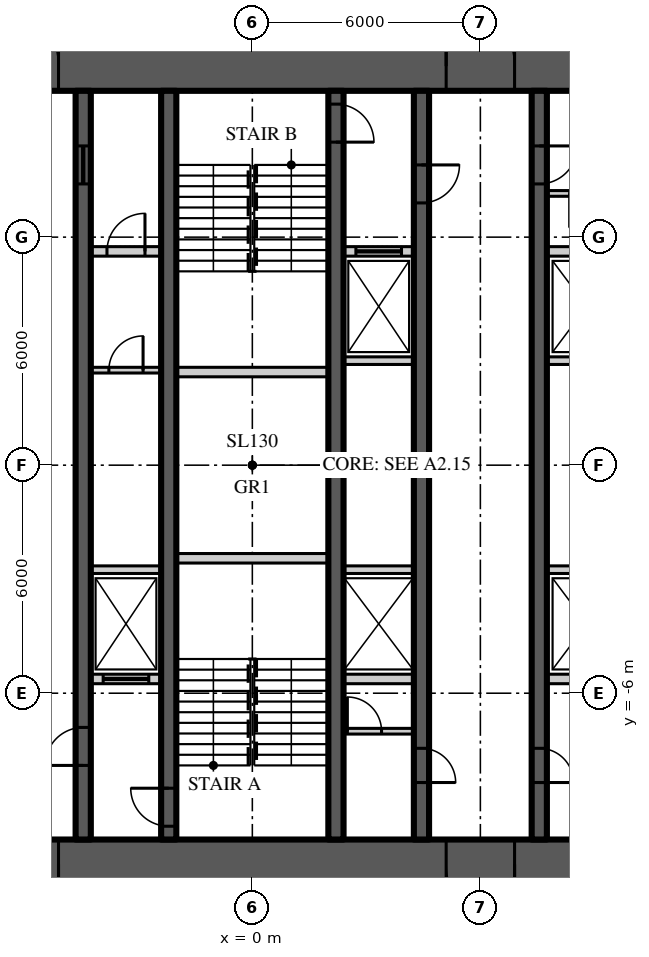
"""IFC4 building model, lengths in metres.
Left out: names, types, materials, properties, quantities, classifications, styles, units other than length and angle.
Written with IfcOpenShell. Run it as: python <this file> out.ifc"""

import sys

from ifc_helpers import new_model, si_unit, direction, frame, frame_2d, origin, place, context, subcontext, project, spatial, rectangle, extrude, element, fill, save


model = new_model("IFC4")
c1 = context("Model", 3, precision=1e-05, world=origin(), true_north=direction((0.0, 1.0)))
c2 = subcontext(c1, "Body", "Model", "MODEL_VIEW")
j1 = project(units=[si_unit("LENGTHUNIT", "METRE"), si_unit("PLANEANGLEUNIT", "RADIAN")], contexts=[c1])
p1 = place(None, origin())
s1 = spatial("IfcSite", under=j1, at=p1, CompositionType="ELEMENT")
p2 = place(p1, origin())
s2 = spatial("IfcBuilding", under=s1, at=p2, CompositionType="ELEMENT")
p3 = place(p2, frame((0.0, 0.0, 102.0)))
s3 = spatial("IfcBuildingStorey", under=s2, at=p3, CompositionType="ELEMENT", Elevation=102.0)
p4 = place(p3, frame((-11.15, 10.5, 0.0), z_axis=(0.0, 0.0, 1.0), x_axis=(1.0, 0.0, 0.0)))
e1 = element("IfcWall", 1, at=p4, inside=s3, PredefinedType="SHEAR", context=c2, shape_type="SweptSolid", body=[
    extrude(rectangle(XDim=22.3, YDim=1.3, at=frame_2d((11.15, 0.0))), origin(), (0.0, 0.0, 1.0), 3.9),
])
p5 = place(p4, frame((4.25, 0.0, 0.0)))
e2 = element("IfcOpeningElement", 2, at=p5, cuts=e1, PredefinedType="OPENING", context=c2, shape_type="SweptSolid", body=[
    extrude(rectangle(XDim=1.8, YDim=2.2, at=frame_2d((0.9, 1.1))), frame((0.0, 0.66, 0.0), z_axis=(0.0, -1.0, 0.0), x_axis=(1.0, 0.0, 0.0)), (0.0, 0.0, 1.0), 1.32),
])
p6 = place(p4, frame((16.25, 0.0, 0.0)))
e3 = element("IfcOpeningElement", 3, at=p6, cuts=e1, PredefinedType="OPENING", context=c2, shape_type="SweptSolid", body=[
    extrude(rectangle(XDim=1.8, YDim=2.2, at=frame_2d((0.9, 1.1))), frame((0.0, 0.66, 0.0), z_axis=(0.0, -1.0, 0.0), x_axis=(1.0, 0.0, 0.0)), (0.0, 0.0, 1.0), 1.32),
])
p7 = place(p3, frame((11.15, -10.5, 0.0), z_axis=(0.0, 0.0, 1.0), x_axis=(-1.0, 0.0, 0.0)))
e4 = element("IfcWall", 4, at=p7, inside=s3, PredefinedType="SHEAR", context=c2, shape_type="SweptSolid", body=[
    extrude(rectangle(XDim=22.3, YDim=1.3, at=frame_2d((11.15, 0.0))), origin(), (0.0, 0.0, 1.0), 3.9),
])
p8 = place(p7, frame((16.25, 0.0, 0.0)))
e5 = element("IfcOpeningElement", 5, at=p8, cuts=e4, PredefinedType="OPENING", context=c2, shape_type="SweptSolid", body=[
    extrude(rectangle(XDim=1.8, YDim=2.2, at=frame_2d((0.9, 1.1))), frame((0.0, 0.66, 0.0), z_axis=(0.0, -1.0, 0.0), x_axis=(1.0, 0.0, 0.0)), (0.0, 0.0, 1.0), 1.32),
])
p9 = place(p7, frame((4.25, 0.0, 0.0)))
e6 = element("IfcOpeningElement", 6, at=p9, cuts=e4, PredefinedType="OPENING", context=c2, shape_type="SweptSolid", body=[
    extrude(rectangle(XDim=1.8, YDim=2.2, at=frame_2d((0.9, 1.1))), frame((0.0, 0.66, 0.0), z_axis=(0.0, -1.0, 0.0), x_axis=(1.0, 0.0, 0.0)), (0.0, 0.0, 1.0), 1.32),
])
p10 = place(p3, frame((7.55, 9.85, 0.0), z_axis=(0.0, 0.0, 1.0), x_axis=(0.0, -1.0, 0.0)))
e7 = element("IfcWall", 7, at=p10, inside=s3, PredefinedType="SHEAR", context=c2, shape_type="SweptSolid", body=[
    extrude(rectangle(XDim=19.7, YDim=0.4, at=frame_2d((9.85, 0.0))), origin(), (0.0, 0.0, 1.0), 3.9),
])
p11 = place(p10, frame((1.45, 0.0, 0.0)))
e8 = element("IfcOpeningElement", 8, at=p11, cuts=e7, PredefinedType="OPENING", context=c2, shape_type="SweptSolid", body=[
    extrude(rectangle(XDim=1.0, YDim=2.2, at=frame_2d((0.5, 1.1))), frame((0.0, 0.21, 0.0), z_axis=(0.0, -1.0, 0.0), x_axis=(1.0, 0.0, 0.0)), (0.0, 0.0, 1.0), 0.42),
])
p12 = place(p10, frame((17.3, 0.0, 0.0)))
e9 = element("IfcOpeningElement", 9, at=p12, cuts=e7, PredefinedType="OPENING", context=c2, shape_type="SweptSolid", body=[
    extrude(rectangle(XDim=0.9, YDim=2.1, at=frame_2d((0.45, 1.05))), frame((0.0, 0.21, 0.0), z_axis=(0.0, -1.0, 0.0), x_axis=(1.0, 0.0, 0.0)), (0.0, 0.0, 1.0), 0.42),
])
p13 = place(p3, frame((-4.45, -9.85, 0.0), z_axis=(0.0, 0.0, 1.0), x_axis=(0.0, 1.0, 0.0)))
e10 = element("IfcWall", 10, at=p13, inside=s3, PredefinedType="SHEAR", context=c2, shape_type="SweptSolid", body=[
    extrude(rectangle(XDim=19.7, YDim=0.4, at=frame_2d((9.85, 0.0))), origin(), (0.0, 0.0, 1.0), 3.9),
])
p14 = place(p13, frame((1.95, 0.0, 0.0)))
e11 = element("IfcOpeningElement", 11, at=p14, cuts=e10, PredefinedType="OPENING", context=c2, shape_type="SweptSolid", body=[
    extrude(rectangle(XDim=1.0, YDim=2.2, at=frame_2d((0.5, 1.1))), frame((0.0, 0.21, 0.0), z_axis=(0.0, -1.0, 0.0), x_axis=(1.0, 0.0, 0.0)), (0.0, 0.0, 1.0), 0.42),
])
p15 = place(p13, frame((17.25, 0.0, 0.0)))
e12 = element("IfcOpeningElement", 12, at=p15, cuts=e10, PredefinedType="OPENING", context=c2, shape_type="SweptSolid", body=[
    extrude(rectangle(XDim=1.0, YDim=2.1, at=frame_2d((0.5, 1.05))), frame((0.0, 0.21, 0.0), z_axis=(0.0, -1.0, 0.0), x_axis=(1.0, 0.0, 0.0)), (0.0, 0.0, 1.0), 0.42),
])
p16 = place(p3, frame((4.45, 9.85, 0.0), z_axis=(0.0, 0.0, 1.0), x_axis=(0.0, -1.0, 0.0)))
e13 = element("IfcWall", 13, at=p16, inside=s3, PredefinedType="SHEAR", context=c2, shape_type="SweptSolid", body=[
    extrude(rectangle(XDim=19.7, YDim=0.4, at=frame_2d((9.85, 0.0))), origin(), (0.0, 0.0, 1.0), 3.9),
])
p17 = place(p16, frame((1.95, 0.0, 0.0)))
e14 = element("IfcOpeningElement", 14, at=p17, cuts=e13, PredefinedType="OPENING", context=c2, shape_type="SweptSolid", body=[
    extrude(rectangle(XDim=1.0, YDim=2.2, at=frame_2d((0.5, 1.1))), frame((0.0, 0.21, 0.0), z_axis=(0.0, -1.0, 0.0), x_axis=(1.0, 0.0, 0.0)), (0.0, 0.0, 1.0), 0.42),
])
p18 = place(p16, frame((17.3, 0.0, 0.0)))
e15 = element("IfcOpeningElement", 15, at=p18, cuts=e13, PredefinedType="OPENING", context=c2, shape_type="SweptSolid", body=[
    extrude(rectangle(XDim=0.9, YDim=2.1, at=frame_2d((0.45, 1.05))), frame((0.0, 0.21, 0.0), z_axis=(0.0, -1.0, 0.0), x_axis=(1.0, 0.0, 0.0)), (0.0, 0.0, 1.0), 0.42),
])
p19 = place(p3, frame((-2.2, -9.85, 0.0), z_axis=(0.0, 0.0, 1.0), x_axis=(0.0, 1.0, 0.0)))
e16 = element("IfcWall", 16, at=p19, inside=s3, PredefinedType="SHEAR", context=c2, shape_type="SweptSolid", body=[
    extrude(rectangle(XDim=19.7, YDim=0.4, at=frame_2d((9.85, 0.0))), origin(), (0.0, 0.0, 1.0), 3.9),
])
p20 = place(p19, frame((0.35, 0.0, 0.0)))
e17 = element("IfcOpeningElement", 17, at=p20, cuts=e16, PredefinedType="OPENING", context=c2, shape_type="SweptSolid", body=[
    extrude(rectangle(XDim=1.0, YDim=2.2, at=frame_2d((0.5, 1.1))), frame((0.0, 0.21, 0.0), z_axis=(0.0, -1.0, 0.0), x_axis=(1.0, 0.0, 0.0)), (0.0, 0.0, 1.0), 0.42),
])
p21 = place(p3, frame((2.2, 9.85, 0.0), z_axis=(0.0, 0.0, 1.0), x_axis=(0.0, -1.0, 0.0)))
e18 = element("IfcWall", 18, at=p21, inside=s3, PredefinedType="SHEAR", context=c2, shape_type="SweptSolid", body=[
    extrude(rectangle(XDim=19.7, YDim=0.4, at=frame_2d((9.85, 0.0))), origin(), (0.0, 0.0, 1.0), 3.9),
])
p22 = place(p21, frame((0.35, 0.0, 0.0)))
e19 = element("IfcOpeningElement", 19, at=p22, cuts=e18, PredefinedType="OPENING", context=c2, shape_type="SweptSolid", body=[
    extrude(rectangle(XDim=1.0, YDim=2.2, at=frame_2d((0.5, 1.1))), frame((0.0, 0.21, 0.0), z_axis=(0.0, -1.0, 0.0), x_axis=(1.0, 0.0, 0.0)), (0.0, 0.0, 1.0), 0.42),
])
p23 = place(p3, frame((-4.25, 5.625, 0.0), z_axis=(0.0, 0.0, 1.0), x_axis=(1.0, 0.0, 0.0)))
e20 = element("IfcWall", 20, at=p23, inside=s3, PredefinedType="SOLIDWALL", context=c2, shape_type="SweptSolid", body=[
    extrude(rectangle(XDim=1.85, YDim=0.25, at=frame_2d((0.925, 0.0))), origin(), (0.0, 0.0, 1.0), 3.7),
])
p24 = place(p23, frame((0.425, 0.0, 0.0)))
e21 = element("IfcOpeningElement", 21, at=p24, cuts=e20, PredefinedType="OPENING", context=c2, shape_type="SweptSolid", body=[
    extrude(rectangle(XDim=1.0, YDim=2.2, at=frame_2d((0.5, 1.1))), frame((0.0, 0.135, 0.0), z_axis=(0.0, -1.0, 0.0), x_axis=(1.0, 0.0, 0.0)), (0.0, 0.0, 1.0), 0.27),
])
p25 = place(p3, frame((2.4, 5.625, 0.0), z_axis=(0.0, 0.0, 1.0), x_axis=(1.0, 0.0, 0.0)))
e22 = element("IfcWall", 22, at=p25, inside=s3, PredefinedType="SOLIDWALL", context=c2, shape_type="SweptSolid", body=[
    extrude(rectangle(XDim=1.85, YDim=0.25, at=frame_2d((0.925, 0.0))), origin(), (0.0, 0.0, 1.0), 3.7),
])
p26 = place(p25, frame((0.325, 0.0, 0.0)))
e23 = element("IfcOpeningElement", 23, at=p26, cuts=e22, PredefinedType="OPENING", context=c2, shape_type="SweptSolid", body=[
    extrude(rectangle(XDim=1.2, YDim=2.2, at=frame_2d((0.6, 1.1))), frame((0.0, 0.135, 0.0), z_axis=(0.0, -1.0, 0.0), x_axis=(1.0, 0.0, 0.0)), (0.0, 0.0, 1.0), 0.27),
])
p27 = place(p3, frame((7.75, 5.625, 0.0), z_axis=(0.0, 0.0, 1.0), x_axis=(1.0, 0.0, 0.0)))
e24 = element("IfcWall", 24, at=p27, inside=s3, PredefinedType="SOLIDWALL", context=c2, shape_type="SweptSolid", body=[
    extrude(rectangle(XDim=2.1, YDim=0.25, at=frame_2d((1.05, 0.0))), origin(), (0.0, 0.0, 1.0), 3.7),
])
p28 = place(p3, frame((-4.25, -5.625, 0.0), z_axis=(0.0, 0.0, 1.0), x_axis=(1.0, 0.0, 0.0)))
e25 = element("IfcWall", 25, at=p28, inside=s3, PredefinedType="SOLIDWALL", context=c2, shape_type="SweptSolid", body=[
    extrude(rectangle(XDim=1.85, YDim=0.25, at=frame_2d((0.925, 0.0))), origin(), (0.0, 0.0, 1.0), 3.7),
])
p29 = place(p28, frame((0.325, 0.0, 0.0)))
e26 = element("IfcOpeningElement", 26, at=p29, cuts=e25, PredefinedType="OPENING", context=c2, shape_type="SweptSolid", body=[
    extrude(rectangle(XDim=1.2, YDim=2.2, at=frame_2d((0.6, 1.1))), frame((0.0, 0.135, 0.0), z_axis=(0.0, -1.0, 0.0), x_axis=(1.0, 0.0, 0.0)), (0.0, 0.0, 1.0), 0.27),
])
p30 = place(p3, frame((2.4, -5.625, 0.0), z_axis=(0.0, 0.0, 1.0), x_axis=(1.0, 0.0, 0.0)))
e27 = element("IfcWall", 27, at=p30, inside=s3, PredefinedType="SOLIDWALL", context=c2, shape_type="SweptSolid", body=[
    extrude(rectangle(XDim=1.85, YDim=0.25, at=frame_2d((0.925, 0.0))), origin(), (0.0, 0.0, 1.0), 3.7),
])
p31 = place(p3, frame((7.75, -5.625, 0.0), z_axis=(0.0, 0.0, 1.0), x_axis=(1.0, 0.0, 0.0)))
e28 = element("IfcWall", 28, at=p31, inside=s3, PredefinedType="SOLIDWALL", context=c2, shape_type="SweptSolid", body=[
    extrude(rectangle(XDim=2.1, YDim=0.25, at=frame_2d((1.05, 0.0))), origin(), (0.0, 0.0, 1.0), 3.7),
])
for number, where, z_axis, x_axis in (
    (29, (-2.0, -2.45, 0.0), (0.0, 0.0, 1.0), (1.0, 0.0, 0.0)),
    (30, (-2.0, 2.45, 0.0), (0.0, 0.0, 1.0), (1.0, 0.0, 0.0)),
):
    element("IfcWall", number, at=place(p3, frame(where, z_axis=z_axis, x_axis=x_axis)), inside=s3, PredefinedType="SOLIDWALL", context=c2, shape_type="SweptSolid", body=[
        extrude(rectangle(XDim=4.0, YDim=0.25, at=frame_2d((2.0, 0.0))), origin(), (0.0, 0.0, 1.0), 3.7),
    ])
for number, where, z_axis, x_axis in (
    (31, (-4.25, -2.75, 0.0), (0.0, 0.0, 1.0), (1.0, 0.0, 0.0)),
    (32, (2.4, -2.75, 0.0), (0.0, 0.0, 1.0), (1.0, 0.0, 0.0)),
):
    element("IfcWall", number, at=place(p3, frame(where, z_axis=z_axis, x_axis=x_axis)), inside=s3, PredefinedType="SOLIDWALL", context=c2, shape_type="SweptSolid", body=[
        extrude(rectangle(XDim=1.85, YDim=0.2, at=frame_2d((0.925, 0.0))), origin(), (0.0, 0.0, 1.0), 3.7),
    ])
p32 = place(p3, frame((7.75, -2.75, 0.0), z_axis=(0.0, 0.0, 1.0), x_axis=(1.0, 0.0, 0.0)))
e33 = element("IfcWall", 33, at=p32, inside=s3, PredefinedType="SOLIDWALL", context=c2, shape_type="SweptSolid", body=[
    extrude(rectangle(XDim=2.1, YDim=0.2, at=frame_2d((1.05, 0.0))), origin(), (0.0, 0.0, 1.0), 3.7),
])
p33 = place(p3, frame((2.4, 2.75, 0.0), z_axis=(0.0, 0.0, 1.0), x_axis=(1.0, 0.0, 0.0)))
e34 = element("IfcWall", 34, at=p33, inside=s3, PredefinedType="SOLIDWALL", context=c2, shape_type="SweptSolid", body=[
    extrude(rectangle(XDim=1.85, YDim=0.2, at=frame_2d((0.925, 0.0))), origin(), (0.0, 0.0, 1.0), 3.7),
])
p34 = place(p3, frame((7.75, 2.75, 0.0), z_axis=(0.0, 0.0, 1.0), x_axis=(1.0, 0.0, 0.0)))
e35 = element("IfcWall", 35, at=p34, inside=s3, PredefinedType="SOLIDWALL", context=c2, shape_type="SweptSolid", body=[
    extrude(rectangle(XDim=2.1, YDim=0.2, at=frame_2d((1.05, 0.0))), origin(), (0.0, 0.0, 1.0), 3.7),
])
p35 = place(p3, frame((-4.25, 2.5, 0.0), z_axis=(0.0, 0.0, 1.0), x_axis=(1.0, 0.0, 0.0)))
e36 = element("IfcWall", 36, at=p35, inside=s3, PredefinedType="SOLIDWALL", context=c2, shape_type="SweptSolid", body=[
    extrude(rectangle(XDim=1.85, YDim=0.15, at=frame_2d((0.925, 0.0))), origin(), (0.0, 0.0, 1.0), 3.77),
])
p36 = place(p35, frame((0.475, 0.0, 0.0)))
e37 = element("IfcOpeningElement", 37, at=p36, cuts=e36, PredefinedType="OPENING", context=c2, shape_type="SweptSolid", body=[
    extrude(rectangle(XDim=0.9, YDim=2.1, at=frame_2d((0.45, 1.05))), frame((0.0, 0.085, 0.0), z_axis=(0.0, -1.0, 0.0), x_axis=(1.0, 0.0, 0.0)), (0.0, 0.0, 1.0), 0.17),
])
p37 = place(p3, frame((2.4, -7.0, 0.0), z_axis=(0.0, 0.0, 1.0), x_axis=(1.0, 0.0, 0.0)))
e38 = element("IfcWall", 38, at=p37, inside=s3, PredefinedType="SOLIDWALL", context=c2, shape_type="SweptSolid", body=[
    extrude(rectangle(XDim=1.85, YDim=0.15, at=frame_2d((0.925, 0.0))), origin(), (0.0, 0.0, 1.0), 3.77),
])
p38 = place(p37, frame((0.1, 0.0, 0.0)))
e39 = element("IfcOpeningElement", 39, at=p38, cuts=e38, PredefinedType="OPENING", context=c2, shape_type="SweptSolid", body=[
    extrude(rectangle(XDim=0.9, YDim=2.1, at=frame_2d((0.45, 1.05))), frame((0.0, 0.085, 0.0), z_axis=(0.0, -1.0, 0.0), x_axis=(1.0, 0.0, 0.0)), (0.0, 0.0, 1.0), 0.17),
])
p39 = place(p3, frame((9.85, 7.15, 0.0), z_axis=(0.0, 0.0, 1.0), x_axis=(-1.0, 0.0, 0.0)))
e40 = element("IfcWall", 40, at=p39, inside=s3, PredefinedType="SOLIDWALL", context=c2, shape_type="SweptSolid", body=[
    extrude(rectangle(XDim=2.1, YDim=0.15, at=frame_2d((1.05, 0.0))), origin(), (0.0, 0.0, 1.0), 3.77),
])
p40 = place(p39, frame((0.6, 0.0, 0.0)))
e41 = element("IfcOpeningElement", 41, at=p40, cuts=e40, PredefinedType="OPENING", context=c2, shape_type="SweptSolid", body=[
    extrude(rectangle(XDim=0.9, YDim=2.1, at=frame_2d((0.45, 1.05))), frame((0.0, 0.085, 0.0), z_axis=(0.0, -1.0, 0.0), x_axis=(1.0, 0.0, 0.0)), (0.0, 0.0, 1.0), 0.17),
])
p41 = place(p5, origin())
e42 = element("IfcDoor", 42, at=p41, inside=s3, OperationType="DOUBLE_DOOR_DOUBLE_SWING", PredefinedType="DOOR", context=c2, shape_type="SweptSolid", body=[
    extrude(rectangle(XDim=1.8, YDim=2.2, at=frame_2d((0.9, 1.1))), frame((0.0, 0.025, 0.0), z_axis=(0.0, -1.0, 0.0), x_axis=(1.0, 0.0, 0.0)), (0.0, 0.0, 1.0), 0.05),
])
fill(e2, e42)
p42 = place(p8, origin())
e43 = element("IfcDoor", 43, at=p42, inside=s3, OperationType="DOUBLE_DOOR_DOUBLE_SWING", PredefinedType="DOOR", context=c2, shape_type="SweptSolid", body=[
    extrude(rectangle(XDim=1.8, YDim=2.2, at=frame_2d((0.9, 1.1))), frame((0.0, 0.025, 0.0), z_axis=(0.0, -1.0, 0.0), x_axis=(1.0, 0.0, 0.0)), (0.0, 0.0, 1.0), 0.05),
])
fill(e5, e43)
p43 = place(p6, origin())
e44 = element("IfcDoor", 44, at=p43, inside=s3, OperationType="DOUBLE_DOOR_DOUBLE_SWING", PredefinedType="DOOR", context=c2, shape_type="SweptSolid", body=[
    extrude(rectangle(XDim=1.8, YDim=2.2, at=frame_2d((0.9, 1.1))), frame((0.0, 0.025, 0.0), z_axis=(0.0, -1.0, 0.0), x_axis=(1.0, 0.0, 0.0)), (0.0, 0.0, 1.0), 0.05),
])
fill(e3, e44)
p44 = place(p9, origin())
e45 = element("IfcDoor", 45, at=p44, inside=s3, OperationType="DOUBLE_DOOR_DOUBLE_SWING", PredefinedType="DOOR", context=c2, shape_type="SweptSolid", body=[
    extrude(rectangle(XDim=1.8, YDim=2.2, at=frame_2d((0.9, 1.1))), frame((0.0, 0.025, 0.0), z_axis=(0.0, -1.0, 0.0), x_axis=(1.0, 0.0, 0.0)), (0.0, 0.0, 1.0), 0.05),
])
fill(e6, e45)
p45 = place(p11, origin())
e46 = element("IfcDoor", 46, at=p45, inside=s3, OperationType="SINGLE_SWING_LEFT", PredefinedType="DOOR", context=c2, shape_type="SweptSolid", body=[
    extrude(rectangle(XDim=1.0, YDim=2.2, at=frame_2d((0.5, 1.1))), frame((0.0, 0.025, 0.0), z_axis=(0.0, -1.0, 0.0), x_axis=(1.0, 0.0, 0.0)), (0.0, 0.0, 1.0), 0.05),
])
fill(e8, e46)
p46 = place(p14, origin())
e47 = element("IfcDoor", 47, at=p46, inside=s3, OperationType="SINGLE_SWING_LEFT", PredefinedType="DOOR", context=c2, shape_type="SweptSolid", body=[
    extrude(rectangle(XDim=1.0, YDim=2.2, at=frame_2d((0.5, 1.1))), frame((0.0, 0.025, 0.0), z_axis=(0.0, -1.0, 0.0), x_axis=(1.0, 0.0, 0.0)), (0.0, 0.0, 1.0), 0.05),
])
fill(e11, e47)
p47 = place(p20, origin())
e48 = element("IfcDoor", 48, at=p47, inside=s3, OperationType="SINGLE_SWING_RIGHT", PredefinedType="DOOR", context=c2, shape_type="SweptSolid", body=[
    extrude(rectangle(XDim=1.0, YDim=2.2, at=frame_2d((0.5, 1.1))), frame((0.0, 0.025, 0.0), z_axis=(0.0, -1.0, 0.0), x_axis=(1.0, 0.0, 0.0)), (0.0, 0.0, 1.0), 0.05),
])
fill(e17, e48)
p48 = place(p17, origin())
e49 = element("IfcDoor", 49, at=p48, inside=s3, OperationType="SINGLE_SWING_LEFT", PredefinedType="DOOR", context=c2, shape_type="SweptSolid", body=[
    extrude(rectangle(XDim=1.0, YDim=2.2, at=frame_2d((0.5, 1.1))), frame((0.0, 0.025, 0.0), z_axis=(0.0, -1.0, 0.0), x_axis=(1.0, 0.0, 0.0)), (0.0, 0.0, 1.0), 0.05),
])
fill(e14, e49)
p49 = place(p22, origin())
e50 = element("IfcDoor", 50, at=p49, inside=s3, OperationType="SINGLE_SWING_RIGHT", PredefinedType="DOOR", context=c2, shape_type="SweptSolid", body=[
    extrude(rectangle(XDim=1.0, YDim=2.2, at=frame_2d((0.5, 1.1))), frame((0.0, 0.025, 0.0), z_axis=(0.0, -1.0, 0.0), x_axis=(1.0, 0.0, 0.0)), (0.0, 0.0, 1.0), 0.05),
])
fill(e19, e50)
p50 = place(p15, origin())
e51 = element("IfcDoor", 51, at=p50, inside=s3, OperationType="SLIDING_TO_LEFT", PredefinedType="DOOR", context=c2, shape_type="SweptSolid", body=[
    extrude(rectangle(XDim=1.0, YDim=2.1, at=frame_2d((0.5, 1.05))), frame((0.0, 0.025, 0.0), z_axis=(0.0, -1.0, 0.0), x_axis=(1.0, 0.0, 0.0)), (0.0, 0.0, 1.0), 0.05),
])
fill(e12, e51)
p51 = place(p12, origin())
e52 = element("IfcDoor", 52, at=p51, inside=s3, OperationType="SINGLE_SWING_RIGHT", PredefinedType="DOOR", context=c2, shape_type="SweptSolid", body=[
    extrude(rectangle(XDim=0.9, YDim=2.1, at=frame_2d((0.45, 1.05))), frame((0.0, 0.025, 0.0), z_axis=(0.0, -1.0, 0.0), x_axis=(1.0, 0.0, 0.0)), (0.0, 0.0, 1.0), 0.05),
])
fill(e9, e52)
p52 = place(p18, origin())
e53 = element("IfcDoor", 53, at=p52, inside=s3, OperationType="SINGLE_SWING_RIGHT", PredefinedType="DOOR", context=c2, shape_type="SweptSolid", body=[
    extrude(rectangle(XDim=0.9, YDim=2.1, at=frame_2d((0.45, 1.05))), frame((0.0, 0.025, 0.0), z_axis=(0.0, -1.0, 0.0), x_axis=(1.0, 0.0, 0.0)), (0.0, 0.0, 1.0), 0.05),
])
fill(e15, e53)
p53 = place(p29, origin())
e54 = element("IfcDoor", 54, at=p53, inside=s3, OperationType="SLIDING_TO_LEFT", PredefinedType="DOOR", context=c2, shape_type="SweptSolid", body=[
    extrude(rectangle(XDim=1.2, YDim=2.2, at=frame_2d((0.6, 1.1))), frame((0.0, 0.025, 0.0), z_axis=(0.0, -1.0, 0.0), x_axis=(1.0, 0.0, 0.0)), (0.0, 0.0, 1.0), 0.05),
])
fill(e26, e54)
p54 = place(p26, origin())
e55 = element("IfcDoor", 55, at=p54, inside=s3, OperationType="SLIDING_TO_LEFT", PredefinedType="DOOR", context=c2, shape_type="SweptSolid", body=[
    extrude(rectangle(XDim=1.2, YDim=2.2, at=frame_2d((0.6, 1.1))), frame((0.0, 0.025, 0.0), z_axis=(0.0, -1.0, 0.0), x_axis=(1.0, 0.0, 0.0)), (0.0, 0.0, 1.0), 0.05),
])
fill(e23, e55)
p55 = place(p36, origin())
e56 = element("IfcDoor", 56, at=p55, inside=s3, OperationType="SINGLE_SWING_RIGHT", PredefinedType="DOOR", context=c2, shape_type="SweptSolid", body=[
    extrude(rectangle(XDim=0.9, YDim=2.1, at=frame_2d((0.45, 1.05))), frame((0.0, 0.025, 0.0), z_axis=(0.0, -1.0, 0.0), x_axis=(1.0, 0.0, 0.0)), (0.0, 0.0, 1.0), 0.05),
])
fill(e37, e56)
p56 = place(p24, origin())
e57 = element("IfcDoor", 57, at=p56, inside=s3, OperationType="SINGLE_SWING_RIGHT", PredefinedType="DOOR", context=c2, shape_type="SweptSolid", body=[
    extrude(rectangle(XDim=1.0, YDim=2.2, at=frame_2d((0.5, 1.1))), frame((0.0, 0.025, 0.0), z_axis=(0.0, -1.0, 0.0), x_axis=(1.0, 0.0, 0.0)), (0.0, 0.0, 1.0), 0.05),
])
fill(e21, e57)
p57 = place(p38, origin())
e58 = element("IfcDoor", 58, at=p57, inside=s3, OperationType="SINGLE_SWING_LEFT", PredefinedType="DOOR", context=c2, shape_type="SweptSolid", body=[
    extrude(rectangle(XDim=0.9, YDim=2.1, at=frame_2d((0.45, 1.05))), frame((0.0, 0.025, 0.0), z_axis=(0.0, -1.0, 0.0), x_axis=(1.0, 0.0, 0.0)), (0.0, 0.0, 1.0), 0.05),
])
fill(e39, e58)
save(model, sys.argv[1])
